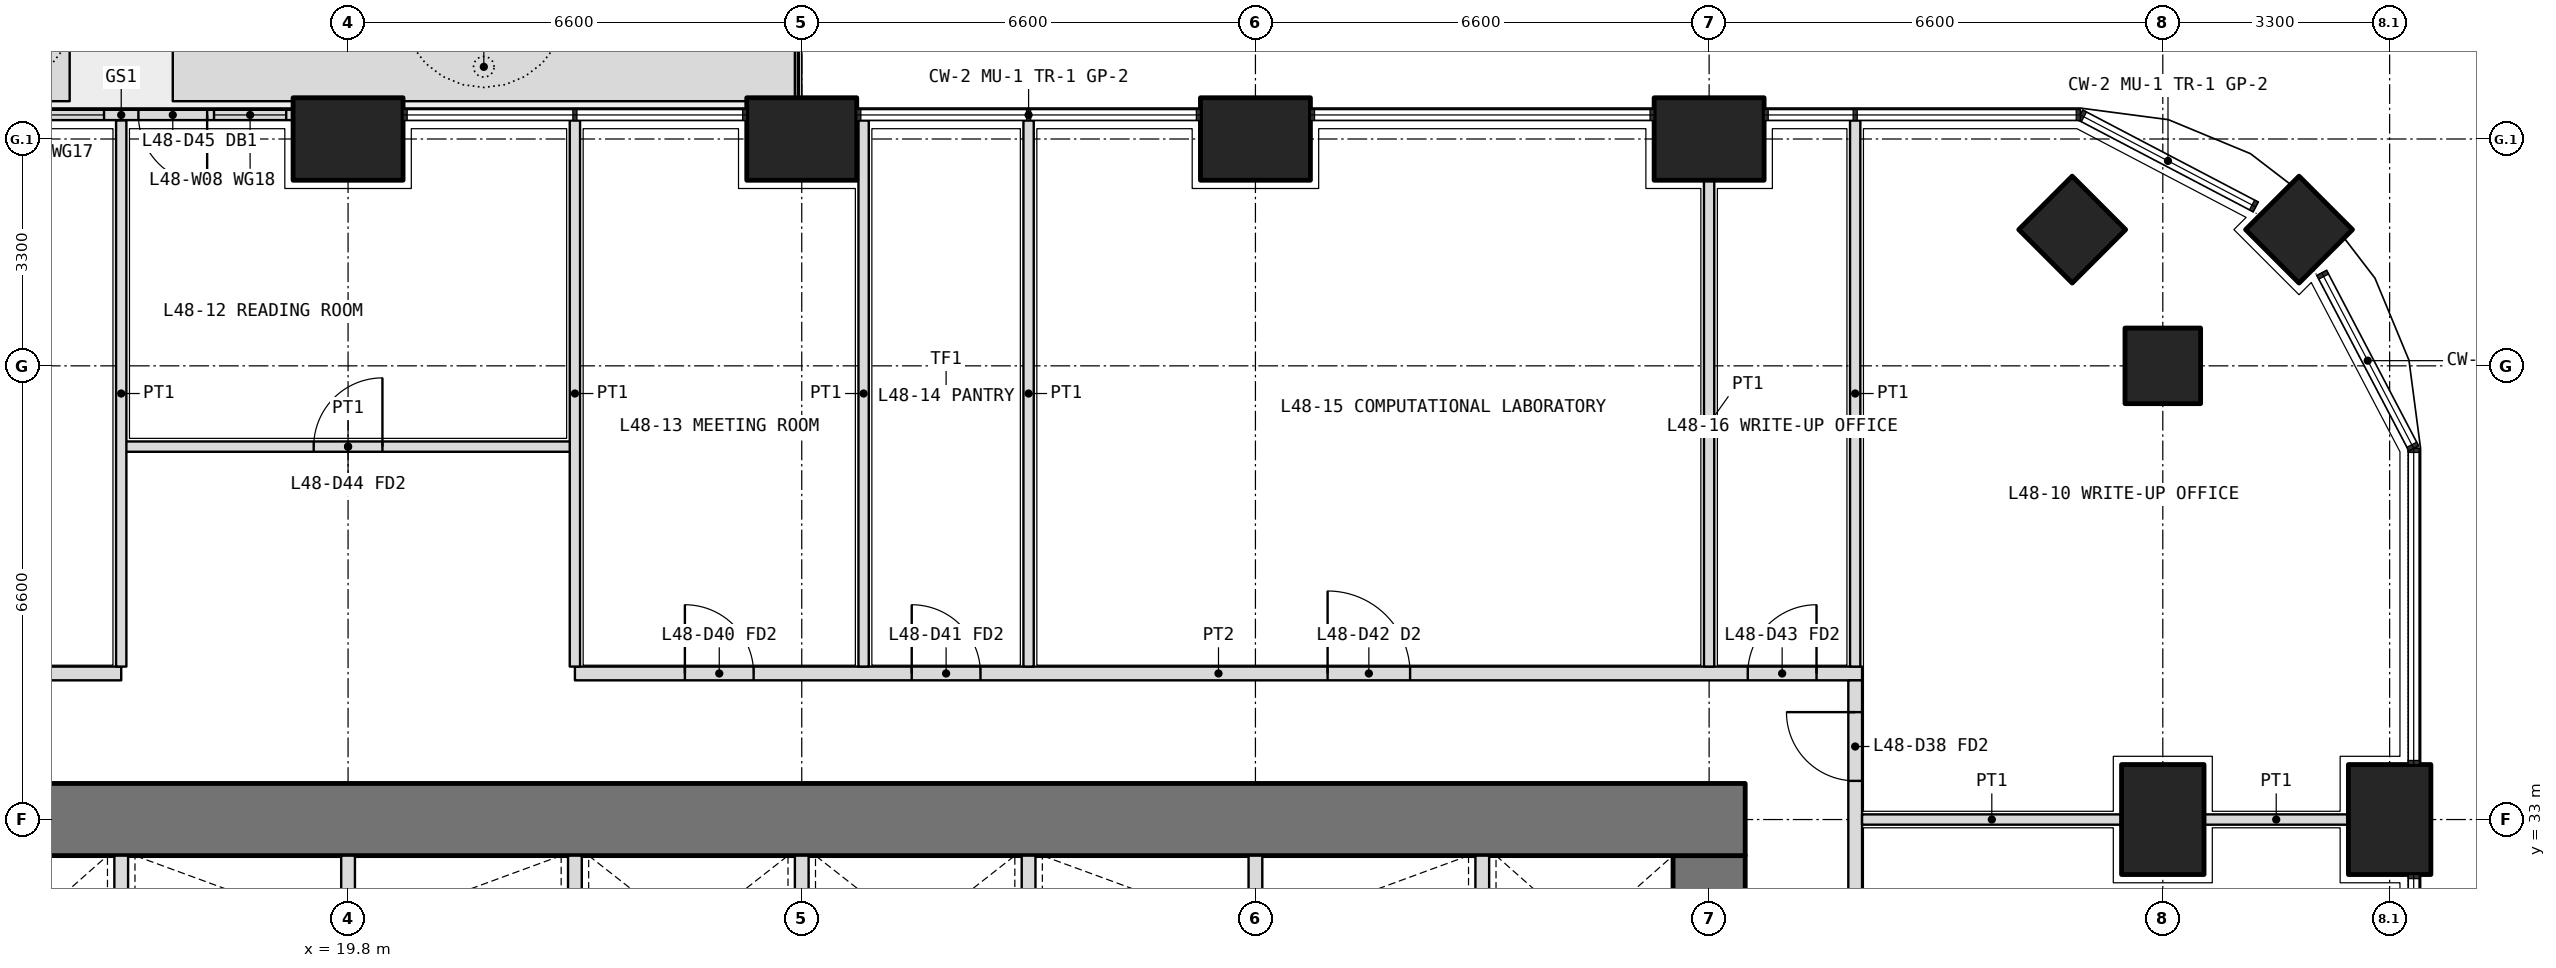
"""IFC4 building model, lengths in metres.
Left out: names, types, materials, properties, quantities, classifications, styles, units other than length and angle.
Written with IfcOpenShell. Run it as: python <this file> out.ifc"""

import sys

from ifc_helpers import new_model, si_unit, direction, frame, frame_2d, origin, origin_2d, place, context, subcontext, project, spatial, polyline, rectangle, outline, extrude, element, fill, save


model = new_model("IFC4")
c1 = context("Model", 3, precision=1e-05, world=origin(), true_north=direction((0.0, 1.0)))
c2 = subcontext(c1, "Body", "Model", "MODEL_VIEW")
j1 = project(units=[si_unit("LENGTHUNIT", "METRE"), si_unit("PLANEANGLEUNIT", "RADIAN")], contexts=[c1])
p1 = place(None, origin())
s1 = spatial("IfcSite", under=j1, at=p1, CompositionType="ELEMENT")
p2 = place(p1, origin())
s2 = spatial("IfcBuilding", under=s1, at=p2, CompositionType="ELEMENT")
p3 = place(p2, frame((0.0, 0.0, 210.3)))
s3 = spatial("IfcBuildingStorey", under=s2, at=p3, CompositionType="ELEMENT", Elevation=210.3)
p4 = place(p3, frame((48.182, 41.582, 0.0), z_axis=(0.0, 0.0, 1.0), x_axis=(0.707106781187, 0.707106781187, 0.0)))
e1 = element("IfcColumn", 1, at=p4, inside=s3, PredefinedType="COLUMN", context=c2, shape_type="SweptSolid", body=[
    extrude(rectangle(XDim=1.1, YDim=1.1, at=origin_2d()), origin(), (0.0, 0.0, 1.0), 4.2),
])
for number, where, z_axis, x_axis in (
    (2, (49.5, 33.0, 0.0), (0.0, 0.0, 1.0), (0.0, 1.0, 0.0)),
    (3, (19.8, 42.9, 0.0), (0.0, 0.0, 1.0), (1.0, 0.0, 0.0)),
    (4, (26.4, 42.9, 0.0), (0.0, 0.0, 1.0), (1.0, 0.0, 0.0)),
    (5, (33.0, 42.9, 0.0), (0.0, 0.0, 1.0), (1.0, 0.0, 0.0)),
    (6, (39.6, 42.9, 0.0), (0.0, 0.0, 1.0), (1.0, 0.0, 0.0)),
):
    element("IfcColumn", number, at=place(p3, frame(where, z_axis=z_axis, x_axis=x_axis)), inside=s3, PredefinedType="COLUMN", context=c2, shape_type="SweptSolid", body=[
        extrude(rectangle(XDim=1.6, YDim=1.2, at=origin_2d()), origin(), (0.0, 0.0, 1.0), 4.2),
    ])
for number, where, z_axis, x_axis in (
    (7, (46.2, 39.6, 0.0), (0.0, 0.0, 1.0), (1.0, 0.0, 0.0)),
    (8, (44.882, 41.582, 0.0), (0.0, 0.0, 1.0), (0.707, 0.707, 0.0)),
):
    element("IfcColumn", number, at=place(p3, frame(where, z_axis=z_axis, x_axis=x_axis)), inside=s3, PredefinedType="COLUMN", context=c2, shape_type="SweptSolid", body=[
        extrude(rectangle(XDim=1.1, YDim=1.1, at=origin_2d()), origin(), (0.0, 0.0, 1.0), 4.2),
    ])
p5 = place(p3, frame((46.2, 33.0, 0.0), z_axis=(0.0, 0.0, 1.0), x_axis=(0.0, 1.0, 0.0)))
e9 = element("IfcColumn", 9, at=p5, inside=s3, PredefinedType="COLUMN", context=c2, shape_type="SweptSolid", body=[
    extrude(rectangle(XDim=1.6, YDim=1.2, at=origin_2d()), origin(), (0.0, 0.0, 1.0), 4.2),
])
p6 = place(p3, origin())
e10 = element("IfcWall", 10, at=p6, inside=s3, PredefinedType="USERDEFINED", context=c2, shape_type="SweptSolid", body=[
    extrude(outline(polyline([(13.3, 43.45), (15.75, 43.45), (15.75, 44.45), (13.3, 44.45), (13.3, 43.45)]), holes=[polyline([(13.45, 43.6), (15.6, 43.6), (15.6, 44.3), (13.45, 44.3), (13.45, 43.6)])]), origin(), (0.0, 0.0, 1.0), 1.05),
])
p7 = place(p3, origin())
e11 = element("IfcWall", 11, at=p7, inside=s3, PredefinedType="USERDEFINED", context=c2, shape_type="SweptSolid", body=[
    extrude(outline(polyline([(17.25, 43.45), (26.3, 43.45), (26.3, 44.45), (17.25, 44.45), (17.25, 43.45)]), holes=[polyline([(17.4, 43.6), (26.15, 43.6), (26.15, 44.3), (17.4, 44.3), (17.4, 43.6)])]), origin(), (0.0, 0.0, 1.0), 1.05),
])
p8 = place(p3, frame((19.0, 43.25, 0.0), z_axis=(0.0, 0.0, 1.0), x_axis=(-1.0, 0.0, 0.0)))
e12 = element("IfcWall", 12, at=p8, inside=s3, PredefinedType="SOLIDWALL", context=c2, shape_type="SweptSolid", body=[
    extrude(rectangle(XDim=5.0, YDim=0.15, at=frame_2d((2.5, 0.0))), origin(), (0.0, 0.0, 1.0), 2.6),
])
p9 = place(p8, frame((1.25, 0.0, 0.0)))
e13 = element("IfcOpeningElement", 13, at=p9, cuts=e12, PredefinedType="OPENING", context=c2, shape_type="SweptSolid", body=[
    extrude(rectangle(XDim=1.0, YDim=2.4, at=frame_2d((0.5, 1.2))), frame((0.0, 0.085, 0.0), z_axis=(0.0, -1.0, 0.0), x_axis=(1.0, 0.0, 0.0)), (0.0, 0.0, 1.0), 0.17),
])
p10 = place(p8, frame((0.1, 0.0, 0.1)))
e14 = element("IfcOpeningElement", 14, at=p10, cuts=e12, PredefinedType="OPENING", context=c2, shape_type="SweptSolid", body=[
    extrude(rectangle(XDim=1.05, YDim=2.2, at=frame_2d((0.525, 1.1))), frame((0.0, 0.085, 0.0), z_axis=(0.0, -1.0, 0.0), x_axis=(1.0, 0.0, 0.0)), (0.0, 0.0, 1.0), 0.17),
])
p11 = place(p8, frame((2.75, 0.0, 0.1)))
e15 = element("IfcOpeningElement", 15, at=p11, cuts=e12, PredefinedType="OPENING", context=c2, shape_type="SweptSolid", body=[
    extrude(rectangle(XDim=2.15, YDim=2.2, at=frame_2d((1.075, 1.1))), frame((0.0, 0.085, 0.0), z_axis=(0.0, -1.0, 0.0), x_axis=(1.0, 0.0, 0.0)), (0.0, 0.0, 1.0), 0.17),
])
p12 = place(p3, frame((39.6, 13.725, 0.0), z_axis=(0.0, 0.0, 1.0), x_axis=(0.0, 1.0, 0.0)))
e16 = element("IfcWall", 16, at=p12, inside=s3, PredefinedType="SHEAR", context=c2, shape_type="SweptSolid", body=[
    extrude(rectangle(XDim=18.75, YDim=1.05, at=frame_2d((9.375, 0.0))), origin(), (0.0, 0.0, 1.0), 4.2),
])
p13 = place(p12, frame((3.025, 0.0, 0.0)))
e17 = element("IfcOpeningElement", 17, at=p13, cuts=e16, PredefinedType="OPENING", context=c2, shape_type="SweptSolid", body=[
    extrude(rectangle(XDim=1.6, YDim=2.1, at=frame_2d((0.8, 1.05))), frame((0.0, 0.535, 0.0), z_axis=(0.0, -1.0, 0.0), x_axis=(1.0, 0.0, 0.0)), (0.0, 0.0, 1.0), 1.07),
])
p14 = place(p12, frame((13.825, 0.0, 0.0)))
e18 = element("IfcOpeningElement", 18, at=p14, cuts=e16, PredefinedType="OPENING", context=c2, shape_type="SweptSolid", body=[
    extrude(rectangle(XDim=1.6, YDim=2.1, at=frame_2d((0.8, 1.05))), frame((0.0, 0.535, 0.0), z_axis=(0.0, -1.0, 0.0), x_axis=(1.0, 0.0, 0.0)), (0.0, 0.0, 1.0), 1.07),
])
p15 = place(p3, frame((40.125, 33.0, 0.0), z_axis=(0.0, 0.0, 1.0), x_axis=(-1.0, 0.0, 0.0)))
e19 = element("IfcWall", 19, at=p15, inside=s3, PredefinedType="SHEAR", context=c2, shape_type="SweptSolid", body=[
    extrude(rectangle(XDim=27.45, YDim=1.05, at=frame_2d((13.725, 0.0))), origin(), (0.0, 0.0, 1.0), 4.2),
])
for number, where, z_axis, x_axis in (
    (20, (16.5, 30.2, 0.0), (0.0, 0.0, 1.0), (0.0, 1.0, 0.0)),
    (21, (19.8, 30.2, 0.0), (0.0, 0.0, 1.0), (0.0, 1.0, 0.0)),
    (22, (23.1, 30.2, 0.0), (0.0, 0.0, 1.0), (0.0, 1.0, 0.0)),
    (23, (26.4, 30.2, 0.0), (0.0, 0.0, 1.0), (0.0, 1.0, 0.0)),
    (24, (29.7, 30.2, 0.0), (0.0, 0.0, 1.0), (0.0, 1.0, 0.0)),
    (25, (33.0, 30.2, 0.0), (0.0, 0.0, 1.0), (0.0, 1.0, 0.0)),
    (26, (36.3, 30.2, 0.0), (0.0, 0.0, 1.0), (0.0, 1.0, 0.0)),
):
    element("IfcWall", number, at=place(p3, frame(where, z_axis=z_axis, x_axis=x_axis)), inside=s3, PredefinedType="PARTITIONING", context=c2, shape_type="SweptSolid", body=[
        extrude(rectangle(XDim=2.275, YDim=0.2, at=frame_2d((1.138, 0.0))), origin(), (0.0, 0.0, 1.0), 4.2),
    ])
p16 = place(p3, frame((10.975, 35.125, 0.0), z_axis=(0.0, 0.0, 1.0), x_axis=(1.0, 0.0, 0.0)))
e27 = element("IfcWall", 27, at=p16, inside=s3, PredefinedType="PARTITIONING", context=c2, shape_type="SweptSolid", body=[
    extrude(rectangle(XDim=5.525, YDim=0.2, at=frame_2d((2.762, 0.0))), origin(), (0.0, 0.0, 1.0), 2.85),
])
p17 = place(p16, frame((2.312, 0.0, 0.0)))
e28 = element("IfcOpeningElement", 28, at=p17, cuts=e27, PredefinedType="OPENING", context=c2, shape_type="SweptSolid", body=[
    extrude(rectangle(XDim=1.0, YDim=2.1, at=frame_2d((0.5, 1.05))), frame((0.0, 0.11, 0.0), z_axis=(0.0, -1.0, 0.0), x_axis=(1.0, 0.0, 0.0)), (0.0, 0.0, 1.0), 0.22),
])
p18 = place(p3, frame((23.1, 35.125, 0.0), z_axis=(0.0, 0.0, 1.0), x_axis=(1.0, 0.0, 0.0)))
e29 = element("IfcWall", 29, at=p18, inside=s3, PredefinedType="PARTITIONING", context=c2, shape_type="SweptSolid", body=[
    extrude(rectangle(XDim=18.725, YDim=0.2, at=frame_2d((9.362, 0.0))), origin(), (0.0, 0.0, 1.0), 2.85),
])
p19 = place(p18, frame((1.6, 0.0, 0.0)))
e30 = element("IfcOpeningElement", 30, at=p19, cuts=e29, PredefinedType="OPENING", context=c2, shape_type="SweptSolid", body=[
    extrude(rectangle(XDim=1.0, YDim=2.1, at=frame_2d((0.5, 1.05))), frame((0.0, 0.11, 0.0), z_axis=(0.0, -1.0, 0.0), x_axis=(1.0, 0.0, 0.0)), (0.0, 0.0, 1.0), 0.22),
])
p20 = place(p18, frame((4.9, 0.0, 0.0)))
e31 = element("IfcOpeningElement", 31, at=p20, cuts=e29, PredefinedType="OPENING", context=c2, shape_type="SweptSolid", body=[
    extrude(rectangle(XDim=1.0, YDim=2.1, at=frame_2d((0.5, 1.05))), frame((0.0, 0.11, 0.0), z_axis=(0.0, -1.0, 0.0), x_axis=(1.0, 0.0, 0.0)), (0.0, 0.0, 1.0), 0.22),
])
p21 = place(p18, frame((10.95, 0.0, 0.0)))
e32 = element("IfcOpeningElement", 32, at=p21, cuts=e29, PredefinedType="OPENING", context=c2, shape_type="SweptSolid", body=[
    extrude(rectangle(XDim=1.2, YDim=2.1, at=frame_2d((0.6, 1.05))), frame((0.0, 0.11, 0.0), z_axis=(0.0, -1.0, 0.0), x_axis=(1.0, 0.0, 0.0)), (0.0, 0.0, 1.0), 0.22),
])
p22 = place(p18, frame((17.062, 0.0, 0.0)))
e33 = element("IfcOpeningElement", 33, at=p22, cuts=e29, PredefinedType="OPENING", context=c2, shape_type="SweptSolid", body=[
    extrude(rectangle(XDim=1.0, YDim=2.1, at=frame_2d((0.5, 1.05))), frame((0.0, 0.11, 0.0), z_axis=(0.0, -1.0, 0.0), x_axis=(1.0, 0.0, 0.0)), (0.0, 0.0, 1.0), 0.22),
])
p23 = place(p3, frame((41.725, 11.175, 0.0), z_axis=(0.0, 0.0, 1.0), x_axis=(0.0, 1.0, 0.0)))
e34 = element("IfcWall", 34, at=p23, inside=s3, PredefinedType="PARTITIONING", context=c2, shape_type="SweptSolid", body=[
    extrude(rectangle(XDim=23.85, YDim=0.2, at=frame_2d((11.925, 0.0))), origin(), (0.0, 0.0, 1.0), 2.85),
])
p24 = place(p23, frame((3.762, 0.0, 0.0)))
e35 = element("IfcOpeningElement", 35, at=p24, cuts=e34, PredefinedType="OPENING", context=c2, shape_type="SweptSolid", body=[
    extrude(rectangle(XDim=1.0, YDim=2.1, at=frame_2d((0.5, 1.05))), frame((0.0, 0.11, 0.0), z_axis=(0.0, -1.0, 0.0), x_axis=(1.0, 0.0, 0.0)), (0.0, 0.0, 1.0), 0.22),
])
p25 = place(p23, frame((9.625, 0.0, 0.0)))
e36 = element("IfcOpeningElement", 36, at=p25, cuts=e34, PredefinedType="OPENING", context=c2, shape_type="SweptSolid", body=[
    extrude(rectangle(XDim=1.0, YDim=2.1, at=frame_2d((0.5, 1.05))), frame((0.0, 0.11, 0.0), z_axis=(0.0, -1.0, 0.0), x_axis=(1.0, 0.0, 0.0)), (0.0, 0.0, 1.0), 0.22),
])
p26 = place(p23, frame((12.975, 0.0, 0.0)))
e37 = element("IfcOpeningElement", 37, at=p26, cuts=e34, PredefinedType="OPENING", context=c2, shape_type="SweptSolid", body=[
    extrude(rectangle(XDim=0.9, YDim=2.1, at=frame_2d((0.45, 1.05))), frame((0.0, 0.11, 0.0), z_axis=(0.0, -1.0, 0.0), x_axis=(1.0, 0.0, 0.0)), (0.0, 0.0, 1.0), 0.22),
])
p27 = place(p23, frame((17.925, 0.0, 0.0)))
e38 = element("IfcOpeningElement", 38, at=p27, cuts=e34, PredefinedType="OPENING", context=c2, shape_type="SweptSolid", body=[
    extrude(rectangle(XDim=1.2, YDim=2.1, at=frame_2d((0.6, 1.05))), frame((0.0, 0.11, 0.0), z_axis=(0.0, -1.0, 0.0), x_axis=(1.0, 0.0, 0.0)), (0.0, 0.0, 1.0), 0.22),
])
p28 = place(p23, frame((22.387, 0.0, 0.0)))
e39 = element("IfcOpeningElement", 39, at=p28, cuts=e34, PredefinedType="OPENING", context=c2, shape_type="SweptSolid", body=[
    extrude(rectangle(XDim=1.0, YDim=2.1, at=frame_2d((0.5, 1.05))), frame((0.0, 0.11, 0.0), z_axis=(0.0, -1.0, 0.0), x_axis=(1.0, 0.0, 0.0)), (0.0, 0.0, 1.0), 0.22),
])
p29 = place(p3, frame((41.725, 43.17, 0.0), z_axis=(0.0, 0.0, 1.0), x_axis=(0.0, -1.0, 0.0)))
e40 = element("IfcWall", 40, at=p29, inside=s3, PredefinedType="PARTITIONING", context=c2, shape_type="SweptSolid", body=[
    extrude(rectangle(XDim=7.945, YDim=0.15, at=frame_2d((3.972, 0.0))), origin(), (0.0, 0.0, 1.0), 2.6),
])
p30 = place(p3, frame((48.9, 33.0, 0.0), z_axis=(0.0, 0.0, 1.0), x_axis=(-1.0, 0.0, 0.0)))
e41 = element("IfcWall", 41, at=p30, inside=s3, PredefinedType="PARTITIONING", context=c2, shape_type="SweptSolid", body=[
    extrude(rectangle(XDim=2.1, YDim=0.15, at=frame_2d((1.05, 0.0))), origin(), (0.0, 0.0, 1.0), 2.85),
])
p31 = place(p3, frame((45.6, 33.0, 0.0), z_axis=(0.0, 0.0, 1.0), x_axis=(-1.0, 0.0, 0.0)))
e42 = element("IfcWall", 42, at=p31, inside=s3, PredefinedType="PARTITIONING", context=c2, shape_type="SweptSolid", body=[
    extrude(rectangle(XDim=3.775, YDim=0.15, at=frame_2d((1.888, 0.0))), origin(), (0.0, 0.0, 1.0), 2.85),
])
p32 = place(p3, frame((16.5, 38.425, 0.0), z_axis=(0.0, 0.0, 1.0), x_axis=(1.0, 0.0, 0.0)))
e43 = element("IfcWall", 43, at=p32, inside=s3, PredefinedType="PARTITIONING", context=c2, shape_type="SweptSolid", body=[
    extrude(rectangle(XDim=6.6, YDim=0.15, at=frame_2d((3.3, 0.0))), origin(), (0.0, 0.0, 1.0), 2.85),
])
p33 = place(p32, frame((2.8, 0.0, 0.0)))
e44 = element("IfcOpeningElement", 44, at=p33, cuts=e43, PredefinedType="OPENING", context=c2, shape_type="SweptSolid", body=[
    extrude(rectangle(XDim=1.0, YDim=2.1, at=frame_2d((0.5, 1.05))), frame((0.0, 0.085, 0.0), z_axis=(0.0, -1.0, 0.0), x_axis=(1.0, 0.0, 0.0)), (0.0, 0.0, 1.0), 0.17),
])
for number, where, z_axis, x_axis in (
    (45, (27.3, 43.17, 0.0), (0.0, 0.0, 1.0), (0.0, -1.0, 0.0)),
    (46, (29.7, 43.17, 0.0), (0.0, 0.0, 1.0), (0.0, -1.0, 0.0)),
    (47, (16.5, 43.17, 0.0), (0.0, 0.0, 1.0), (0.0, -1.0, 0.0)),
    (48, (23.1, 43.17, 0.0), (0.0, 0.0, 1.0), (0.0, -1.0, 0.0)),
):
    element("IfcWall", number, at=place(p3, frame(where, z_axis=z_axis, x_axis=x_axis)), inside=s3, PredefinedType="PARTITIONING", context=c2, shape_type="SweptSolid", body=[
        extrude(rectangle(XDim=7.945, YDim=0.15, at=frame_2d((3.972, 0.0))), origin(), (0.0, 0.0, 1.0), 2.6),
    ])
p34 = place(p3, frame((39.6, 42.3, 0.0), z_axis=(0.0, 0.0, 1.0), x_axis=(0.0, -1.0, 0.0)))
e49 = element("IfcWall", 49, at=p34, inside=s3, PredefinedType="PARTITIONING", context=c2, shape_type="SweptSolid", body=[
    extrude(rectangle(XDim=7.075, YDim=0.15, at=frame_2d((3.538, 0.0))), origin(), (0.0, 0.0, 1.0), 2.85),
])
p35 = place(p9, origin())
e50 = element("IfcDoor", 50, at=p35, inside=s3, OperationType="SINGLE_SWING_LEFT", PredefinedType="DOOR", context=c2, shape_type="SweptSolid", body=[
    extrude(rectangle(XDim=1.0, YDim=2.4, at=frame_2d((0.5, 1.2))), frame((0.0, 0.025, 0.0), z_axis=(0.0, -1.0, 0.0), x_axis=(1.0, 0.0, 0.0)), (0.0, 0.0, 1.0), 0.05),
])
fill(e13, e50)
p36 = place(p10, origin())
e51 = element("IfcWindow", 51, at=p36, inside=s3, PartitioningType="SINGLE_PANEL", PredefinedType="WINDOW", context=c2, shape_type="SweptSolid", body=[
    extrude(rectangle(XDim=1.05, YDim=2.2, at=frame_2d((0.525, 1.1))), frame((0.0, 0.03, 0.0), z_axis=(0.0, -1.0, 0.0), x_axis=(1.0, 0.0, 0.0)), (0.0, 0.0, 1.0), 0.06),
])
fill(e14, e51)
p37 = place(p11, origin())
e52 = element("IfcWindow", 52, at=p37, inside=s3, PartitioningType="SINGLE_PANEL", PredefinedType="WINDOW", context=c2, shape_type="SweptSolid", body=[
    extrude(rectangle(XDim=2.15, YDim=2.2, at=frame_2d((1.075, 1.1))), frame((0.0, 0.03, 0.0), z_axis=(0.0, -1.0, 0.0), x_axis=(1.0, 0.0, 0.0)), (0.0, 0.0, 1.0), 0.06),
])
fill(e15, e52)
p38 = place(p28, origin())
e53 = element("IfcDoor", 53, at=p38, inside=s3, OperationType="SINGLE_SWING_RIGHT", PredefinedType="DOOR", context=c2, shape_type="SweptSolid", body=[
    extrude(rectangle(XDim=1.0, YDim=2.1, at=frame_2d((0.5, 1.05))), frame((0.0, 0.025, 0.0), z_axis=(0.0, -1.0, 0.0), x_axis=(1.0, 0.0, 0.0)), (0.0, 0.0, 1.0), 0.05),
])
fill(e39, e53)
p39 = place(p33, origin())
e54 = element("IfcDoor", 54, at=p39, inside=s3, OperationType="SINGLE_SWING_RIGHT", PredefinedType="DOOR", context=c2, shape_type="SweptSolid", body=[
    extrude(rectangle(XDim=1.0, YDim=2.1, at=frame_2d((0.5, 1.05))), frame((0.0, 0.025, 0.0), z_axis=(0.0, -1.0, 0.0), x_axis=(1.0, 0.0, 0.0)), (0.0, 0.0, 1.0), 0.05),
])
fill(e44, e54)
p40 = place(p19, origin())
e55 = element("IfcDoor", 55, at=p40, inside=s3, OperationType="SINGLE_SWING_LEFT", PredefinedType="DOOR", context=c2, shape_type="SweptSolid", body=[
    extrude(rectangle(XDim=1.0, YDim=2.1, at=frame_2d((0.5, 1.05))), frame((0.0, 0.025, 0.0), z_axis=(0.0, -1.0, 0.0), x_axis=(1.0, 0.0, 0.0)), (0.0, 0.0, 1.0), 0.05),
])
fill(e30, e55)
p41 = place(p20, origin())
e56 = element("IfcDoor", 56, at=p41, inside=s3, OperationType="SINGLE_SWING_LEFT", PredefinedType="DOOR", context=c2, shape_type="SweptSolid", body=[
    extrude(rectangle(XDim=1.0, YDim=2.1, at=frame_2d((0.5, 1.05))), frame((0.0, 0.025, 0.0), z_axis=(0.0, -1.0, 0.0), x_axis=(1.0, 0.0, 0.0)), (0.0, 0.0, 1.0), 0.05),
])
fill(e31, e56)
p42 = place(p21, origin())
e57 = element("IfcDoor", 57, at=p42, inside=s3, OperationType="DOUBLE_DOOR_SINGLE_SWING", PredefinedType="DOOR", context=c2, shape_type="SweptSolid", body=[
    extrude(rectangle(XDim=1.2, YDim=2.1, at=frame_2d((0.6, 1.05))), frame((0.0, 0.025, 0.0), z_axis=(0.0, -1.0, 0.0), x_axis=(1.0, 0.0, 0.0)), (0.0, 0.0, 1.0), 0.05),
])
fill(e32, e57)
p43 = place(p22, origin())
e58 = element("IfcDoor", 58, at=p43, inside=s3, OperationType="SINGLE_SWING_RIGHT", PredefinedType="DOOR", context=c2, shape_type="SweptSolid", body=[
    extrude(rectangle(XDim=1.0, YDim=2.1, at=frame_2d((0.5, 1.05))), frame((0.0, 0.025, 0.0), z_axis=(0.0, -1.0, 0.0), x_axis=(1.0, 0.0, 0.0)), (0.0, 0.0, 1.0), 0.05),
])
fill(e33, e58)
save(model, sys.argv[1])
